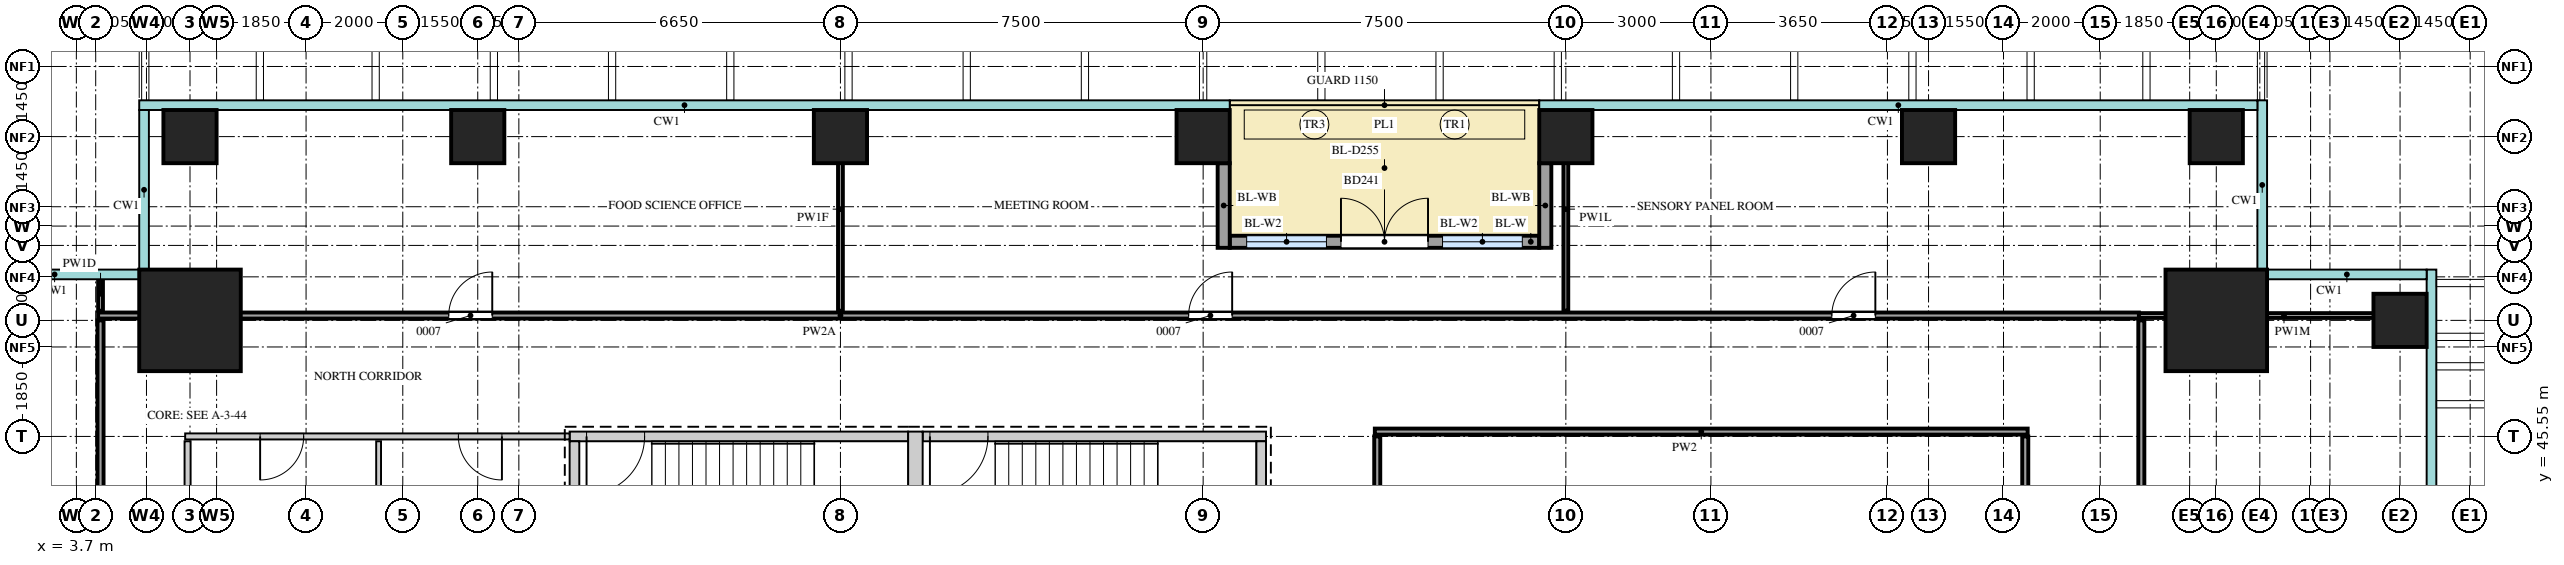
"""IFC4 building model, lengths in metres.
Left out: names, types, materials, properties, quantities, classifications, styles, units other than length and angle.
Written with IfcOpenShell. Run it as: python <this file> out.ifc"""

import sys

from ifc_helpers import new_model, si_unit, direction, frame, frame_2d, origin, origin_2d, place, context, subcontext, project, spatial, rectangle, extrude, source, transform, mapped, element, fill, save


model = new_model("IFC4")
c1 = context("Model", 3, precision=1e-05, world=origin(), true_north=direction((0.0, 1.0)))
c2 = subcontext(c1, "Body", "Model", "MODEL_VIEW")
j1 = project(units=[si_unit("LENGTHUNIT", "METRE"), si_unit("PLANEANGLEUNIT", "RADIAN")], contexts=[c1])
p1 = place(None, origin())
s1 = spatial("IfcSite", under=j1, at=p1, CompositionType="ELEMENT")
p2 = place(p1, origin())
s2 = spatial("IfcBuilding", under=s1, at=p2, CompositionType="ELEMENT")
p3 = place(p2, frame((0.0, 0.0, 114.7)))
s3 = spatial("IfcBuildingStorey", under=s2, at=p3, CompositionType="ELEMENT", Elevation=114.7)
m1 = source(origin(), c2, "Body", "SweptSolid", [
    extrude(rectangle(XDim=7.0, YDim=0.2, at=frame_2d((3.5, 0.0))), origin(), (0.0, 0.0, 1.0), 4.1),
])
p4 = place(p3, frame((13.9, 45.55, 0.0), z_axis=(0.0, 0.0, 1.0), x_axis=(1.0, 0.0, 0.0)))
e1 = element("IfcWall", 1, at=p4, inside=s3, PredefinedType="SHEAR", context=c2, shape_type="MappedRepresentation", body=[
    mapped(m1, transform((0.0, 0.0, 0.0))),
])
m2 = source(origin(), c2, "Body", "SweptSolid", [
    extrude(rectangle(XDim=1.2, YDim=2.1, at=frame_2d((0.6, 1.05))), frame((0.0, 0.11, 0.0), z_axis=(0.0, -1.0, 0.0), x_axis=(1.0, 0.0, 0.0)), (0.0, 0.0, 1.0), 0.22),
])
p5 = place(p4, frame((0.35, 0.0, 0.0)))
e2 = element("IfcOpeningElement", 2, at=p5, cuts=e1, PredefinedType="OPENING", context=c2, shape_type="MappedRepresentation", body=[
    mapped(m2, transform((0.0, 0.0, 0.0))),
])
m3 = source(origin(), c2, "Body", "SweptSolid", [
    extrude(rectangle(XDim=7.1, YDim=0.2, at=frame_2d((3.55, 0.0))), origin(), (0.0, 0.0, 1.0), 4.1),
])
p6 = place(p3, frame((21.2, 45.55, 0.0), z_axis=(0.0, 0.0, 1.0), x_axis=(1.0, 0.0, 0.0)))
e3 = element("IfcWall", 3, at=p6, inside=s3, PredefinedType="SHEAR", context=c2, shape_type="MappedRepresentation", body=[
    mapped(m3, transform((0.0, 0.0, 0.0))),
])
p7 = place(p6, frame((0.15, 0.0, 0.0)))
e4 = element("IfcOpeningElement", 4, at=p7, cuts=e3, PredefinedType="OPENING", context=c2, shape_type="MappedRepresentation", body=[
    mapped(m2, transform((0.0, 0.0, 0.0))),
])
m4 = source(origin(), c2, "Body", "SweptSolid", [
    extrude(rectangle(XDim=3.75, YDim=0.3, at=frame_2d((1.875, 0.0))), origin(), (0.0, 0.0, 1.0), 4.1),
])
p8 = place(p3, frame((21.05, 41.9, 0.0), z_axis=(0.0, 0.0, 1.0), x_axis=(0.0, 1.0, 0.0)))
e5 = element("IfcWall", 5, at=p8, inside=s3, PredefinedType="SHEAR", context=c2, shape_type="MappedRepresentation", body=[
    mapped(m4, transform((0.0, 0.0, 0.0))),
])
m5 = source(origin(), c2, "Body", "SweptSolid", [
    extrude(rectangle(XDim=3.35, YDim=0.2, at=frame_2d((1.675, 0.0))), origin(), (0.0, 0.0, 1.0), 4.1),
])
for number, where, z_axis, x_axis in (
    (6, (14.0, 42.1, 0.0), (0.0, 0.0, 1.0), (0.0, 1.0, 0.0)),
    (7, (28.2, 42.1, 0.0), (0.0, 0.0, 1.0), (0.0, 1.0, 0.0)),
):
    element("IfcWall", number, at=place(p3, frame(where, z_axis=z_axis, x_axis=x_axis)), inside=s3, PredefinedType="SHEAR", context=c2, shape_type="MappedRepresentation", body=[
        mapped(m5, transform((0.0, 0.0, 0.0))),
    ])
m6 = source(origin(), c2, "Body", "SweptSolid", [
    extrude(rectangle(XDim=2.1, YDim=2.1, at=origin_2d()), origin(), (0.0, 0.0, 1.0), 4.4),
])
for number, where, z_axis, x_axis in (
    (8, (47.95, 47.95, 0.0), (0.0, 0.0, 1.0), (1.0, 0.0, 0.0)),
    (9, (6.05, 47.95, 0.0), (0.0, 0.0, 1.0), (1.0, 0.0, 0.0)),
):
    element("IfcColumn", number, at=place(p3, frame(where, z_axis=z_axis, x_axis=x_axis)), inside=s3, PredefinedType="COLUMN", context=c2, shape_type="MappedRepresentation", body=[
        mapped(m6, transform((0.0, 0.0, 0.0))),
    ])
m7 = source(origin(), c2, "Body", "SweptSolid", [
    extrude(rectangle(XDim=1.1, YDim=1.1, at=origin_2d()), origin(), (0.0, 0.0, 1.0), 4.1),
])
for number, where, z_axis, x_axis in (
    (10, (51.75, 47.95, 0.0), (0.0, 0.0, 1.0), (1.0, 0.0, 0.0)),
    (11, (6.05, 51.75, 0.0), (0.0, 0.0, 1.0), (1.0, 0.0, 0.0)),
    (12, (12.0, 51.75, 0.0), (0.0, 0.0, 1.0), (1.0, 0.0, 0.0)),
    (13, (19.5, 51.75, 0.0), (0.0, 0.0, 1.0), (1.0, 0.0, 0.0)),
    (14, (27.0, 51.75, 0.0), (0.0, 0.0, 1.0), (1.0, 0.0, 0.0)),
    (15, (34.5, 51.75, 0.0), (0.0, 0.0, 1.0), (1.0, 0.0, 0.0)),
    (16, (42.0, 51.75, 0.0), (0.0, 0.0, 1.0), (1.0, 0.0, 0.0)),
    (17, (47.95, 51.75, 0.0), (0.0, 0.0, 1.0), (1.0, 0.0, 0.0)),
):
    element("IfcColumn", number, at=place(p3, frame(where, z_axis=z_axis, x_axis=x_axis)), inside=s3, PredefinedType="COLUMN", context=c2, shape_type="MappedRepresentation", body=[
        mapped(m7, transform((0.0, 0.0, 0.0))),
    ])
m8 = source(origin(), c2, "Body", "SweptSolid", [
    extrude(rectangle(XDim=6.4, YDim=0.25, at=frame_2d((3.2, 0.0))), origin(), (0.0, 0.0, 1.0), 4.1),
])
p9 = place(p3, frame((27.55, 49.575, 0.0), z_axis=(0.0, 0.0, 1.0), x_axis=(1.0, 0.0, 0.0)))
e18 = element("IfcWall", 18, at=p9, inside=s3, PredefinedType="SOLIDWALL", context=c2, shape_type="MappedRepresentation", body=[
    mapped(m8, transform((0.0, 0.0, 0.0))),
])
m9 = source(origin(), c2, "Body", "SweptSolid", [
    extrude(rectangle(XDim=1.65, YDim=2.4, at=frame_2d((0.825, 1.2))), frame((0.0, 0.135, 0.0), z_axis=(0.0, -1.0, 0.0), x_axis=(1.0, 0.0, 0.0)), (0.0, 0.0, 1.0), 0.27),
])
p10 = place(p9, frame((0.35, 0.0, 0.0)))
e19 = element("IfcOpeningElement", 19, at=p10, cuts=e18, PredefinedType="OPENING", context=c2, shape_type="MappedRepresentation", body=[
    mapped(m9, transform((0.0, 0.0, 0.0))),
])
p11 = place(p9, frame((4.4, 0.0, 0.0)))
e20 = element("IfcOpeningElement", 20, at=p11, cuts=e18, PredefinedType="OPENING", context=c2, shape_type="MappedRepresentation", body=[
    mapped(m9, transform((0.0, 0.0, 0.0))),
])
m10 = source(origin(), c2, "Body", "SweptSolid", [
    extrude(rectangle(XDim=1.8, YDim=2.4, at=frame_2d((0.9, 1.2))), frame((0.0, 0.135, 0.0), z_axis=(0.0, -1.0, 0.0), x_axis=(1.0, 0.0, 0.0)), (0.0, 0.0, 1.0), 0.27),
])
p12 = place(p9, frame((2.3, 0.0, 0.0)))
e21 = element("IfcOpeningElement", 21, at=p12, cuts=e18, PredefinedType="OPENING", context=c2, shape_type="MappedRepresentation", body=[
    mapped(m10, transform((0.0, 0.0, 0.0))),
])
m11 = source(origin(), c2, "Body", "SweptSolid", [
    extrude(rectangle(XDim=1.75, YDim=0.25, at=frame_2d((0.875, 0.0))), origin(), (0.0, 0.0, 1.0), 3.8),
])
for number, where, z_axis, x_axis in (
    (22, (27.425, 51.2, 0.0), (0.0, 0.0, 1.0), (0.0, -1.0, 0.0)),
    (23, (34.075, 51.2, 0.0), (0.0, 0.0, 1.0), (0.0, -1.0, 0.0)),
):
    element("IfcWall", number, at=place(p3, frame(where, z_axis=z_axis, x_axis=x_axis)), inside=s3, PredefinedType="SOLIDWALL", context=c2, shape_type="MappedRepresentation", body=[
        mapped(m11, transform((0.0, 0.0, 0.0))),
    ])
m12 = source(origin(), c2, "Body", "SweptSolid", [
    extrude(rectangle(XDim=37.65, YDim=0.125, at=frame_2d((18.825, 0.0))), origin(), (0.0, 0.0, 1.0), 4.2),
])
p13 = place(p3, frame((46.4, 10.3, 0.0), z_axis=(0.0, 0.0, 1.0), x_axis=(0.0, 1.0, 0.0)))
e24 = element("IfcWall", 24, at=p13, inside=s3, PredefinedType="PARTITIONING", context=c2, shape_type="MappedRepresentation", body=[
    mapped(m12, transform((0.0, 0.0, 0.0))),
])
m13 = source(origin(), c2, "Body", "SweptSolid", [
    extrude(rectangle(XDim=1.2, YDim=2.1, at=frame_2d((0.6, 1.05))), frame((0.0, 0.073, 0.0), z_axis=(0.0, -1.0, 0.0), x_axis=(1.0, 0.0, 0.0)), (0.0, 0.0, 1.0), 0.145),
])
p14 = place(p13, frame((11.6, 0.0, 0.0)))
e25 = element("IfcOpeningElement", 25, at=p14, cuts=e24, PredefinedType="OPENING", context=c2, shape_type="MappedRepresentation", body=[
    mapped(m13, transform((0.0, 0.0, 0.0))),
])
m14 = source(origin(), c2, "Body", "SweptSolid", [
    extrude(rectangle(XDim=0.9, YDim=2.1, at=frame_2d((0.45, 1.05))), frame((0.0, 0.073, 0.0), z_axis=(0.0, -1.0, 0.0), x_axis=(1.0, 0.0, 0.0)), (0.0, 0.0, 1.0), 0.145),
])
p15 = place(p13, frame((29.45, 0.0, 0.0)))
e26 = element("IfcOpeningElement", 26, at=p15, cuts=e24, PredefinedType="OPENING", context=c2, shape_type="MappedRepresentation", body=[
    mapped(m14, transform((0.0, 0.0, 0.0))),
])
m15 = source(origin(), c2, "Body", "SweptSolid", [
    extrude(rectangle(XDim=32.85, YDim=0.125, at=frame_2d((16.425, 0.0))), origin(), (0.0, 0.0, 1.0), 4.2),
])
p16 = place(p3, frame((44.0, 12.7, 0.0), z_axis=(0.0, 0.0, 1.0), x_axis=(0.0, 1.0, 0.0)))
e27 = element("IfcWall", 27, at=p16, inside=s3, PredefinedType="PARTITIONING", context=c2, shape_type="MappedRepresentation", body=[
    mapped(m15, transform((0.0, 0.0, 0.0))),
])
p17 = place(p16, frame((18.2, 0.0, 0.0)))
e28 = element("IfcOpeningElement", 28, at=p17, cuts=e27, PredefinedType="OPENING", context=c2, shape_type="MappedRepresentation", body=[
    mapped(m13, transform((0.0, 0.0, 0.0))),
])
p18 = place(p16, frame((27.5, 0.0, 0.0)))
e29 = element("IfcOpeningElement", 29, at=p18, cuts=e27, PredefinedType="OPENING", context=c2, shape_type="MappedRepresentation", body=[
    mapped(m13, transform((0.0, 0.0, 0.0))),
])
m16 = source(origin(), c2, "Body", "SweptSolid", [
    extrude(rectangle(XDim=28.75, YDim=0.125, at=frame_2d((14.375, 0.0))), origin(), (0.0, 0.0, 1.0), 4.2),
])
p19 = place(p3, frame((4.2, 19.2, 0.0), z_axis=(0.0, 0.0, 1.0), x_axis=(0.0, 1.0, 0.0)))
e30 = element("IfcWall", 30, at=p19, inside=s3, PredefinedType="PARTITIONING", context=c2, shape_type="MappedRepresentation", body=[
    mapped(m16, transform((0.0, 0.0, 0.0))),
])
p20 = place(p19, frame((3.45, 0.0, 0.0)))
e31 = element("IfcOpeningElement", 31, at=p20, cuts=e30, PredefinedType="OPENING", context=c2, shape_type="MappedRepresentation", body=[
    mapped(m14, transform((0.0, 0.0, 0.0))),
])
p21 = place(p19, frame((16.5, 0.0, 0.0)))
e32 = element("IfcOpeningElement", 32, at=p21, cuts=e30, PredefinedType="OPENING", context=c2, shape_type="MappedRepresentation", body=[
    mapped(m14, transform((0.0, 0.0, 0.0))),
])
m17 = source(origin(), c2, "Body", "SweptSolid", [
    extrude(rectangle(XDim=9.45, YDim=0.125, at=frame_2d((4.725, 0.0))), origin(), (0.0, 0.0, 1.0), 4.2),
])
p22 = place(p3, frame((30.6, 36.1, 0.0), z_axis=(0.0, 0.0, 1.0), x_axis=(0.0, 1.0, 0.0)))
e33 = element("IfcWall", 33, at=p22, inside=s3, PredefinedType="PARTITIONING", context=c2, shape_type="MappedRepresentation", body=[
    mapped(m17, transform((0.0, 0.0, 0.0))),
])
m18 = source(origin(), c2, "Body", "SweptSolid", [
    extrude(rectangle(XDim=3.45, YDim=0.125, at=frame_2d((1.725, 0.0))), origin(), (0.0, 0.0, 1.0), 4.2),
])
p23 = place(p3, frame((6.0, 42.0, 0.0), z_axis=(0.0, 0.0, 1.0), x_axis=(0.0, 1.0, 0.0)))
e34 = element("IfcWall", 34, at=p23, inside=s3, PredefinedType="PARTITIONING", context=c2, shape_type="MappedRepresentation", body=[
    mapped(m18, transform((0.0, 0.0, 0.0))),
])
m19 = source(origin(), c2, "Body", "SweptSolid", [
    extrude(rectangle(XDim=3.45, YDim=0.1, at=frame_2d((1.725, 0.0))), origin(), (0.0, 0.0, 1.0), 4.2),
])
p24 = place(p3, frame((9.95, 42.0, 0.0), z_axis=(0.0, 0.0, 1.0), x_axis=(0.0, 1.0, 0.0)))
e35 = element("IfcWall", 35, at=p24, inside=s3, PredefinedType="PARTITIONING", context=c2, shape_type="MappedRepresentation", body=[
    mapped(m19, transform((0.0, 0.0, 0.0))),
])
m20 = source(origin(), c2, "Body", "SweptSolid", [
    extrude(rectangle(XDim=7.95, YDim=0.125, at=frame_2d((3.975, 0.0))), origin(), (0.0, 0.0, 1.0), 4.2),
])
p25 = place(p3, frame((5.95, 45.55, 0.0), z_axis=(0.0, 0.0, 1.0), x_axis=(1.0, 0.0, 0.0)))
e36 = element("IfcWall", 36, at=p25, inside=s3, PredefinedType="PARTITIONING", context=c2, shape_type="MappedRepresentation", body=[
    mapped(m20, transform((0.0, 0.0, 0.0))),
])
p26 = place(p25, frame((1.55, 0.0, 0.0)))
e37 = element("IfcOpeningElement", 37, at=p26, cuts=e36, PredefinedType="OPENING", context=c2, shape_type="MappedRepresentation", body=[
    mapped(m14, transform((0.0, 0.0, 0.0))),
])
p27 = place(p25, frame((5.65, 0.0, 0.0)))
e38 = element("IfcOpeningElement", 38, at=p27, cuts=e36, PredefinedType="OPENING", context=c2, shape_type="MappedRepresentation", body=[
    mapped(m14, transform((0.0, 0.0, 0.0))),
])
m21 = source(origin(), c2, "Body", "SweptSolid", [
    extrude(rectangle(XDim=13.5, YDim=0.125, at=frame_2d((6.75, 0.0))), origin(), (0.0, 0.0, 1.0), 4.2),
])
p28 = place(p3, frame((30.55, 45.65, 0.0), z_axis=(0.0, 0.0, 1.0), x_axis=(1.0, 0.0, 0.0)))
e39 = element("IfcWall", 39, at=p28, inside=s3, PredefinedType="PARTITIONING", context=c2, shape_type="MappedRepresentation", body=[
    mapped(m21, transform((0.0, 0.0, 0.0))),
])
m22 = source(origin(), c2, "Body", "SweptSolid", [
    extrude(rectangle(XDim=42.2, YDim=0.125, at=frame_2d((21.1, 0.0))), origin(), (0.0, 0.0, 1.0), 3.55),
])
p29 = place(p3, frame((4.15, 48.05, 0.0), z_axis=(0.0, 0.0, 1.0), x_axis=(1.0, 0.0, 0.0)))
e40 = element("IfcWall", 40, at=p29, inside=s3, PredefinedType="PARTITIONING", context=c2, shape_type="MappedRepresentation", body=[
    mapped(m22, transform((0.0, 0.0, 0.0))),
])
p30 = place(p29, frame((7.25, 0.0, 0.0)))
e41 = element("IfcOpeningElement", 41, at=p30, cuts=e40, PredefinedType="OPENING", context=c2, shape_type="MappedRepresentation", body=[
    mapped(m14, transform((0.0, 0.0, 0.0))),
])
p31 = place(p29, frame((22.55, 0.0, 0.0)))
e42 = element("IfcOpeningElement", 42, at=p31, cuts=e40, PredefinedType="OPENING", context=c2, shape_type="MappedRepresentation", body=[
    mapped(m14, transform((0.0, 0.0, 0.0))),
])
p32 = place(p29, frame((35.85, 0.0, 0.0)))
e43 = element("IfcOpeningElement", 43, at=p32, cuts=e40, PredefinedType="OPENING", context=c2, shape_type="MappedRepresentation", body=[
    mapped(m14, transform((0.0, 0.0, 0.0))),
])
m23 = source(origin(), c2, "Body", "SweptSolid", [
    extrude(rectangle(XDim=6.0, YDim=0.1, at=frame_2d((3.0, 0.0))), origin(), (0.0, 0.0, 1.0), 3.55),
])
p33 = place(p3, frame((46.35, 48.05, 0.0), z_axis=(0.0, 0.0, 1.0), x_axis=(1.0, 0.0, 0.0)))
e44 = element("IfcWall", 44, at=p33, inside=s3, PredefinedType="PARTITIONING", context=c2, shape_type="MappedRepresentation", body=[
    mapped(m23, transform((0.0, 0.0, 0.0))),
])
m24 = source(origin(), c2, "Body", "SweptSolid", [
    extrude(rectangle(XDim=0.7, YDim=0.1, at=frame_2d((0.35, 0.0))), origin(), (0.0, 0.0, 1.0), 4.2),
])
p34 = place(p3, frame((4.2, 48.15, 0.0), z_axis=(0.0, 0.0, 1.0), x_axis=(0.0, 1.0, 0.0)))
e45 = element("IfcWall", 45, at=p34, inside=s3, PredefinedType="PARTITIONING", context=c2, shape_type="MappedRepresentation", body=[
    mapped(m24, transform((0.0, 0.0, 0.0))),
])
m25 = source(origin(), c2, "Body", "SweptSolid", [
    extrude(rectangle(XDim=4.2, YDim=0.1, at=frame_2d((2.1, 0.0))), origin(), (0.0, 0.0, 1.0), 3.77),
])
p35 = place(p3, frame((19.5, 48.15, 0.0), z_axis=(0.0, 0.0, 1.0), x_axis=(0.0, 1.0, 0.0)))
e46 = element("IfcWall", 46, at=p35, inside=s3, PredefinedType="PARTITIONING", context=c2, shape_type="MappedRepresentation", body=[
    mapped(m25, transform((0.0, 0.0, 0.0))),
])
m26 = source(origin(), c2, "Body", "SweptSolid", [
    extrude(rectangle(XDim=4.2, YDim=0.1, at=frame_2d((2.1, 0.0))), origin(), (0.0, 0.0, 1.0), 3.6),
])
p36 = place(p3, frame((34.5, 48.15, 0.0), z_axis=(0.0, 0.0, 1.0), x_axis=(0.0, 1.0, 0.0)))
e47 = element("IfcWall", 47, at=p36, inside=s3, PredefinedType="PARTITIONING", context=c2, shape_type="MappedRepresentation", body=[
    mapped(m26, transform((0.0, 0.0, 0.0))),
])
m27 = source(origin(), c2, "Body", "SweptSolid", [
    extrude(rectangle(XDim=1.65, YDim=2.4, at=frame_2d((0.825, 1.2))), frame((0.0, 0.03, 0.0), z_axis=(0.0, -1.0, 0.0), x_axis=(1.0, 0.0, 0.0)), (0.0, 0.0, 1.0), 0.06),
])
p37 = place(p10, origin())
e48 = element("IfcWindow", 48, at=p37, inside=s3, PartitioningType="SINGLE_PANEL", PredefinedType="WINDOW", context=c2, shape_type="MappedRepresentation", body=[
    mapped(m27, transform((0.0, 0.0, 0.0))),
])
fill(e19, e48)
p38 = place(p11, origin())
e49 = element("IfcWindow", 49, at=p38, inside=s3, PartitioningType="SINGLE_PANEL", PredefinedType="WINDOW", context=c2, shape_type="MappedRepresentation", body=[
    mapped(m27, transform((0.0, 0.0, 0.0))),
])
fill(e20, e49)
m28 = source(origin(), c2, "Body", "SweptSolid", [
    extrude(rectangle(XDim=1.8, YDim=2.4, at=frame_2d((0.9, 1.2))), frame((0.0, 0.025, 0.0), z_axis=(0.0, -1.0, 0.0), x_axis=(1.0, 0.0, 0.0)), (0.0, 0.0, 1.0), 0.05),
])
p39 = place(p12, origin())
e50 = element("IfcDoor", 50, at=p39, inside=s3, OperationType="DOUBLE_DOOR_DOUBLE_SWING", PredefinedType="DOOR", context=c2, shape_type="MappedRepresentation", body=[
    mapped(m28, transform((0.0, 0.0, 0.0))),
])
fill(e21, e50)
m29 = source(origin(), c2, "Body", "SweptSolid", [
    extrude(rectangle(XDim=0.9, YDim=2.1, at=frame_2d((0.45, 1.05))), frame((0.0, 0.025, 0.0), z_axis=(0.0, -1.0, 0.0), x_axis=(1.0, 0.0, 0.0)), (0.0, 0.0, 1.0), 0.05),
])
p40 = place(p30, origin())
e51 = element("IfcDoor", 51, at=p40, inside=s3, OperationType="SINGLE_SWING_LEFT", PredefinedType="DOOR", context=c2, shape_type="MappedRepresentation", body=[
    mapped(m29, transform((0.0, 0.0, 0.0))),
])
fill(e41, e51)
p41 = place(p31, origin())
e52 = element("IfcDoor", 52, at=p41, inside=s3, OperationType="SINGLE_SWING_LEFT", PredefinedType="DOOR", context=c2, shape_type="MappedRepresentation", body=[
    mapped(m29, transform((0.0, 0.0, 0.0))),
])
fill(e42, e52)
p42 = place(p32, origin())
e53 = element("IfcDoor", 53, at=p42, inside=s3, OperationType="SINGLE_SWING_LEFT", PredefinedType="DOOR", context=c2, shape_type="MappedRepresentation", body=[
    mapped(m29, transform((0.0, 0.0, 0.0))),
])
fill(e43, e53)
p43 = place(p26, origin())
e54 = element("IfcDoor", 54, at=p43, inside=s3, OperationType="SINGLE_SWING_LEFT", PredefinedType="DOOR", context=c2, shape_type="MappedRepresentation", body=[
    mapped(m29, transform((0.0, 0.0, 0.0))),
])
fill(e37, e54)
p44 = place(p27, origin())
e55 = element("IfcDoor", 55, at=p44, inside=s3, OperationType="SINGLE_SWING_RIGHT", PredefinedType="DOOR", context=c2, shape_type="MappedRepresentation", body=[
    mapped(m29, transform((0.0, 0.0, 0.0))),
])
fill(e38, e55)
m30 = source(origin(), c2, "Body", "SweptSolid", [
    extrude(rectangle(XDim=1.2, YDim=2.1, at=frame_2d((0.6, 1.05))), frame((0.0, 0.025, 0.0), z_axis=(0.0, -1.0, 0.0), x_axis=(1.0, 0.0, 0.0)), (0.0, 0.0, 1.0), 0.05),
])
p45 = place(p5, origin())
e56 = element("IfcDoor", 56, at=p45, inside=s3, OperationType="SINGLE_SWING_LEFT", PredefinedType="DOOR", context=c2, shape_type="MappedRepresentation", body=[
    mapped(m30, transform((0.0, 0.0, 0.0))),
])
fill(e2, e56)
p46 = place(p7, origin())
e57 = element("IfcDoor", 57, at=p46, inside=s3, OperationType="SINGLE_SWING_LEFT", PredefinedType="DOOR", context=c2, shape_type="MappedRepresentation", body=[
    mapped(m30, transform((0.0, 0.0, 0.0))),
])
fill(e4, e57)
save(model, sys.argv[1])
